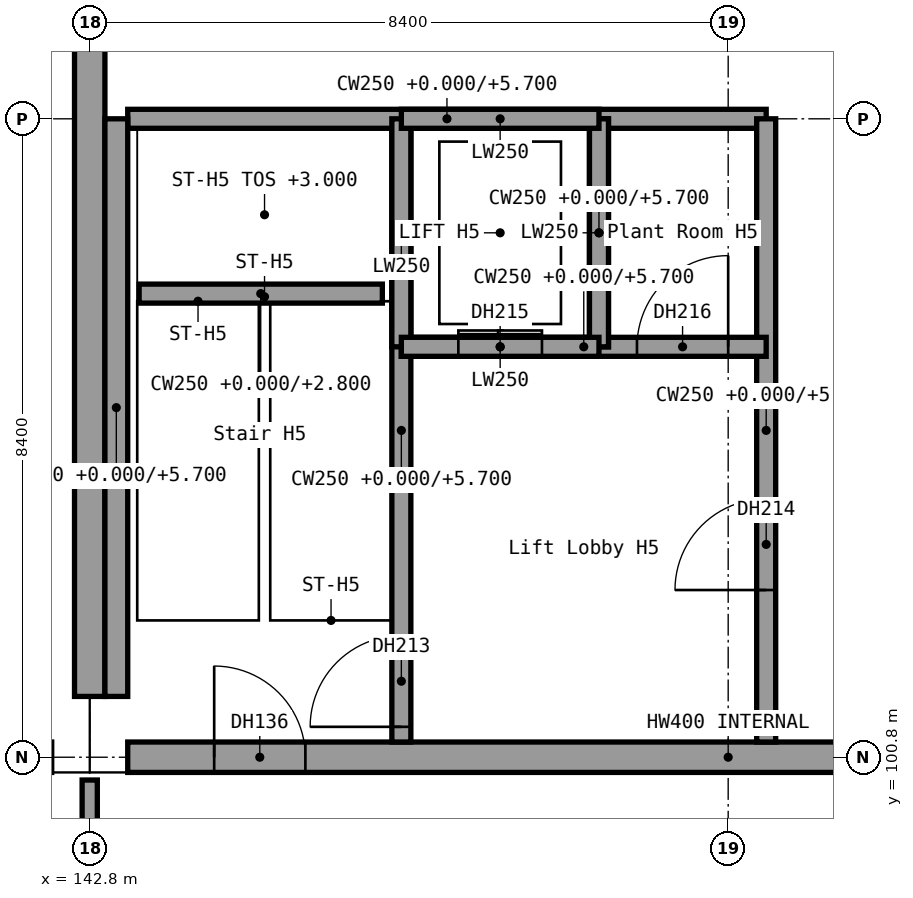
"""IFC4 building model, lengths in metres.
Left out: names, types, materials, properties, quantities, classifications, styles, units other than length and angle.
Written with IfcOpenShell. Run it as: python <this file> out.ifc"""

import sys

from ifc_helpers import new_model, si_unit, direction, frame, frame_2d, origin, origin_2d, place, context, subcontext, project, spatial, rectangle, extrude, element, fill, save


model = new_model("IFC4")
c1 = context("Model", 3, precision=1e-05, world=origin(), true_north=direction((0.0, 1.0)))
c2 = subcontext(c1, "Body", "Model", "MODEL_VIEW")
j1 = project(units=[si_unit("LENGTHUNIT", "METRE"), si_unit("PLANEANGLEUNIT", "RADIAN")], contexts=[c1])
p1 = place(None, origin())
s1 = spatial("IfcSite", under=j1, at=p1, CompositionType="ELEMENT")
p2 = place(p1, origin())
s2 = spatial("IfcBuilding", under=s1, at=p2, CompositionType="ELEMENT")
p3 = place(p2, origin())
s3 = spatial("IfcBuildingStorey", under=s2, at=p3, CompositionType="ELEMENT", Elevation=0.0)
p4 = place(p3, frame((142.8, 100.8, 0.0), z_axis=(0.0, 0.0, 1.0), x_axis=(1.0, 0.0, 0.0)))
e1 = element("IfcColumn", 1, at=p4, inside=s3, PredefinedType="COLUMN", context=c2, shape_type="SweptSolid", body=[
    extrude(rectangle(XDim=1.0, YDim=1.6, at=origin_2d()), origin(), (0.0, 0.0, 1.0), 6.0),
])
p5 = place(p3, frame((143.3, 100.8, 0.0), z_axis=(0.0, 0.0, 1.0), x_axis=(1.0, 0.0, 0.0)))
e2 = element("IfcWall", 2, at=p5, inside=s3, PredefinedType="STANDARD", context=c2, shape_type="SweptSolid", body=[
    extrude(rectangle(XDim=15.8, YDim=0.4, at=frame_2d((7.9, 0.0))), origin(), (0.0, 0.0, 1.0), 4.5),
])
p6 = place(p5, frame((1.137, 0.0, 0.0)))
e3 = element("IfcOpeningElement", 3, at=p6, cuts=e2, PredefinedType="OPENING", context=c2, shape_type="SweptSolid", body=[
    extrude(rectangle(XDim=1.2, YDim=2.1, at=frame_2d((0.6, 1.05))), frame((0.0, 0.2, 0.0), z_axis=(0.0, -1.0, 0.0), x_axis=(1.0, 0.0, 0.0)), (0.0, 0.0, 1.0), 0.4),
])
p7 = place(p3, frame((142.8, 101.6, 0.0), z_axis=(0.0, 0.0, 1.0), x_axis=(0.0, 1.0, 0.0)))
e4 = element("IfcWall", 4, at=p7, inside=s3, PredefinedType="SHEAR", context=c2, shape_type="SweptSolid", body=[
    extrude(rectangle(XDim=99.2, YDim=0.4, at=frame_2d((49.6, 0.0))), origin(), (0.0, 0.0, 1.0), 6.0),
])
p8 = place(p7, frame((19.2, 0.0, 0.0)))
e5 = element("IfcOpeningElement", 5, at=p8, cuts=e4, PredefinedType="OPENING", context=c2, shape_type="SweptSolid", body=[
    extrude(rectangle(XDim=2.4, YDim=2.4, at=frame_2d((1.2, 1.2))), frame((0.0, 0.2, 0.0), z_axis=(0.0, -1.0, 0.0), x_axis=(1.0, 0.0, 0.0)), (0.0, 0.0, 1.0), 0.4),
])
p9 = place(p7, frame((39.2, 0.0, 0.0)))
e6 = element("IfcOpeningElement", 6, at=p9, cuts=e4, PredefinedType="OPENING", context=c2, shape_type="SweptSolid", body=[
    extrude(rectangle(XDim=2.4, YDim=2.4, at=frame_2d((1.2, 1.2))), frame((0.0, 0.2, 0.0), z_axis=(0.0, -1.0, 0.0), x_axis=(1.0, 0.0, 0.0)), (0.0, 0.0, 1.0), 0.4),
])
p10 = place(p7, frame((57.2, 0.0, 0.0)))
e7 = element("IfcOpeningElement", 7, at=p10, cuts=e4, PredefinedType="OPENING", context=c2, shape_type="SweptSolid", body=[
    extrude(rectangle(XDim=2.4, YDim=2.4, at=frame_2d((1.2, 1.2))), frame((0.0, 0.2, 0.0), z_axis=(0.0, -1.0, 0.0), x_axis=(1.0, 0.0, 0.0)), (0.0, 0.0, 1.0), 0.4),
])
p11 = place(p7, frame((77.2, 0.0, 0.0)))
e8 = element("IfcOpeningElement", 8, at=p11, cuts=e4, PredefinedType="OPENING", context=c2, shape_type="SweptSolid", body=[
    extrude(rectangle(XDim=2.4, YDim=2.4, at=frame_2d((1.2, 1.2))), frame((0.0, 0.2, 0.0), z_axis=(0.0, -1.0, 0.0), x_axis=(1.0, 0.0, 0.0)), (0.0, 0.0, 1.0), 0.4),
])
p12 = place(p3, frame((146.9, 101.0, 0.0), z_axis=(0.0, 0.0, 1.0), x_axis=(0.0, 1.0, 0.0)))
e9 = element("IfcWall", 9, at=p12, inside=s3, PredefinedType="SHEAR", context=c2, shape_type="SweptSolid", body=[
    extrude(rectangle(XDim=8.2, YDim=0.25, at=frame_2d((4.1, 0.0))), origin(), (0.0, 0.0, 1.0), 5.7),
])
p13 = place(p12, frame((0.2, 0.0, 0.0)))
e10 = element("IfcOpeningElement", 10, at=p13, cuts=e9, PredefinedType="OPENING", context=c2, shape_type="SweptSolid", body=[
    extrude(rectangle(XDim=1.2, YDim=2.1, at=frame_2d((0.6, 1.05))), frame((0.0, 0.125, 0.0), z_axis=(0.0, -1.0, 0.0), x_axis=(1.0, 0.0, 0.0)), (0.0, 0.0, 1.0), 0.25),
])
p14 = place(p3, frame((143.3, 109.2, 0.0), z_axis=(0.0, 0.0, 1.0), x_axis=(1.0, 0.0, 0.0)))
e11 = element("IfcWall", 11, at=p14, inside=s3, PredefinedType="SHEAR", context=c2, shape_type="SweptSolid", body=[
    extrude(rectangle(XDim=8.4, YDim=0.25, at=frame_2d((4.2, 0.0))), origin(), (0.0, 0.0, 1.0), 5.7),
])
p15 = place(p3, frame((151.7, 101.0, 0.0), z_axis=(0.0, 0.0, 1.0), x_axis=(0.0, 1.0, 0.0)))
e12 = element("IfcWall", 12, at=p15, inside=s3, PredefinedType="SHEAR", context=c2, shape_type="SweptSolid", body=[
    extrude(rectangle(XDim=8.2, YDim=0.25, at=frame_2d((4.1, 0.0))), origin(), (0.0, 0.0, 1.0), 5.7),
])
p16 = place(p15, frame((2.0, 0.0, 0.0)))
e13 = element("IfcOpeningElement", 13, at=p16, cuts=e12, PredefinedType="OPENING", context=c2, shape_type="SweptSolid", body=[
    extrude(rectangle(XDim=1.2, YDim=2.1, at=frame_2d((0.6, 1.05))), frame((0.0, 0.125, 0.0), z_axis=(0.0, -1.0, 0.0), x_axis=(1.0, 0.0, 0.0)), (0.0, 0.0, 1.0), 0.25),
])
p17 = place(p3, frame((146.9, 106.2, 0.0), z_axis=(0.0, 0.0, 1.0), x_axis=(1.0, 0.0, 0.0)))
e14 = element("IfcWall", 14, at=p17, inside=s3, PredefinedType="SHEAR", context=c2, shape_type="SweptSolid", body=[
    extrude(rectangle(XDim=4.8, YDim=0.25, at=frame_2d((2.4, 0.0))), origin(), (0.0, 0.0, 1.0), 5.7),
])
p18 = place(p17, frame((0.75, 0.0, 0.0)))
e15 = element("IfcOpeningElement", 15, at=p18, cuts=e14, PredefinedType="OPENING", context=c2, shape_type="SweptSolid", body=[
    extrude(rectangle(XDim=1.1, YDim=2.1, at=frame_2d((0.55, 1.05))), frame((0.0, 0.125, 0.0), z_axis=(0.0, -1.0, 0.0), x_axis=(1.0, 0.0, 0.0)), (0.0, 0.0, 1.0), 0.25),
])
p19 = place(p17, frame((3.1, 0.0, 0.0)))
e16 = element("IfcOpeningElement", 16, at=p19, cuts=e14, PredefinedType="OPENING", context=c2, shape_type="SweptSolid", body=[
    extrude(rectangle(XDim=1.2, YDim=2.1, at=frame_2d((0.6, 1.05))), frame((0.0, 0.125, 0.0), z_axis=(0.0, -1.0, 0.0), x_axis=(1.0, 0.0, 0.0)), (0.0, 0.0, 1.0), 0.25),
])
p20 = place(p3, frame((149.5, 106.2, 0.0), z_axis=(0.0, 0.0, 1.0), x_axis=(0.0, 1.0, 0.0)))
e17 = element("IfcWall", 17, at=p20, inside=s3, PredefinedType="SHEAR", context=c2, shape_type="SweptSolid", body=[
    extrude(rectangle(XDim=3.0, YDim=0.25, at=frame_2d((1.5, 0.0))), origin(), (0.0, 0.0, 1.0), 5.7),
])
p21 = place(p3, frame((143.15, 101.6, 0.0), z_axis=(0.0, 0.0, 1.0), x_axis=(0.0, 1.0, 0.0)))
e18 = element("IfcWall", 18, at=p21, inside=s3, PredefinedType="SHEAR", context=c2, shape_type="SweptSolid", body=[
    extrude(rectangle(XDim=7.6, YDim=0.3, at=frame_2d((3.8, 0.0))), origin(), (0.0, 0.0, 1.0), 5.7),
])
p22 = place(p3, frame((143.45, 106.9, 0.0), z_axis=(0.0, 0.0, 1.0), x_axis=(1.0, 0.0, 0.0)))
e19 = element("IfcWall", 19, at=p22, inside=s3, PredefinedType="SHEAR", context=c2, shape_type="SweptSolid", body=[
    extrude(rectangle(XDim=3.2, YDim=0.25, at=frame_2d((1.6, 0.0))), origin(), (0.0, 0.0, 1.0), 2.8),
])
for number, where, z_axis, x_axis in (
    (20, (146.9, 106.2, -1.4), (0.0, 0.0, 1.0), (0.0, 1.0, 0.0)),
    (21, (149.5, 106.2, -1.4), (0.0, 0.0, 1.0), (0.0, 1.0, 0.0)),
):
    element("IfcWall", number, at=place(p3, frame(where, z_axis=z_axis, x_axis=x_axis)), inside=s3, PredefinedType="SHEAR", context=c2, shape_type="SweptSolid", body=[
        extrude(rectangle(XDim=3.0, YDim=0.25, at=frame_2d((1.5, 0.0))), origin(), (0.0, 0.0, 1.0), 1.4),
    ])
for number, where, z_axis, x_axis in (
    (22, (146.9, 106.2, -1.4), (0.0, 0.0, 1.0), (1.0, 0.0, 0.0)),
    (23, (146.9, 109.2, -1.4), (0.0, 0.0, 1.0), (1.0, 0.0, 0.0)),
):
    element("IfcWall", number, at=place(p3, frame(where, z_axis=z_axis, x_axis=x_axis)), inside=s3, PredefinedType="SHEAR", context=c2, shape_type="SweptSolid", body=[
        extrude(rectangle(XDim=2.6, YDim=0.25, at=frame_2d((1.3, 0.0))), origin(), (0.0, 0.0, 1.0), 1.4),
    ])
p23 = place(p3, frame((142.8, 100.5, 0.0), z_axis=(0.0, 0.0, 1.0), x_axis=(0.0, -1.0, 0.0)))
e24 = element("IfcWall", 24, at=p23, inside=s3, PredefinedType="PARTITIONING", context=c2, shape_type="SweptSolid", body=[
    extrude(rectangle(XDim=7.7, YDim=0.2, at=frame_2d((3.85, 0.0))), origin(), (0.0, 0.0, 1.0), 5.7),
])
p24 = place(p6, origin())
e25 = element("IfcDoor", 25, at=p24, inside=s3, OperationType="SINGLE_SWING_LEFT", PredefinedType="DOOR", context=c2, shape_type="SweptSolid", body=[
    extrude(rectangle(XDim=1.2, YDim=2.1, at=frame_2d((0.6, 1.05))), frame((0.0, 0.025, 0.0), z_axis=(0.0, -1.0, 0.0), x_axis=(1.0, 0.0, 0.0)), (0.0, 0.0, 1.0), 0.05),
])
fill(e3, e25)
p25 = place(p13, origin())
e26 = element("IfcDoor", 26, at=p25, inside=s3, OperationType="SINGLE_SWING_LEFT", PredefinedType="DOOR", context=c2, shape_type="SweptSolid", body=[
    extrude(rectangle(XDim=1.2, YDim=2.1, at=frame_2d((0.6, 1.05))), frame((0.0, 0.025, 0.0), z_axis=(0.0, -1.0, 0.0), x_axis=(1.0, 0.0, 0.0)), (0.0, 0.0, 1.0), 0.05),
])
fill(e10, e26)
p26 = place(p16, origin())
e27 = element("IfcDoor", 27, at=p26, inside=s3, OperationType="SINGLE_SWING_LEFT", PredefinedType="DOOR", context=c2, shape_type="SweptSolid", body=[
    extrude(rectangle(XDim=1.2, YDim=2.1, at=frame_2d((0.6, 1.05))), frame((0.0, 0.025, 0.0), z_axis=(0.0, -1.0, 0.0), x_axis=(1.0, 0.0, 0.0)), (0.0, 0.0, 1.0), 0.05),
])
fill(e13, e27)
p27 = place(p18, origin())
e28 = element("IfcDoor", 28, at=p27, inside=s3, OperationType="DOUBLE_DOOR_SLIDING", PredefinedType="DOOR", context=c2, shape_type="SweptSolid", body=[
    extrude(rectangle(XDim=1.1, YDim=2.1, at=frame_2d((0.55, 1.05))), frame((0.0, 0.025, 0.0), z_axis=(0.0, -1.0, 0.0), x_axis=(1.0, 0.0, 0.0)), (0.0, 0.0, 1.0), 0.05),
])
fill(e15, e28)
p28 = place(p19, origin())
e29 = element("IfcDoor", 29, at=p28, inside=s3, OperationType="SINGLE_SWING_RIGHT", PredefinedType="DOOR", context=c2, shape_type="SweptSolid", body=[
    extrude(rectangle(XDim=1.2, YDim=2.1, at=frame_2d((0.6, 1.05))), frame((0.0, 0.025, 0.0), z_axis=(0.0, -1.0, 0.0), x_axis=(1.0, 0.0, 0.0)), (0.0, 0.0, 1.0), 0.05),
])
fill(e16, e29)
save(model, sys.argv[1])
